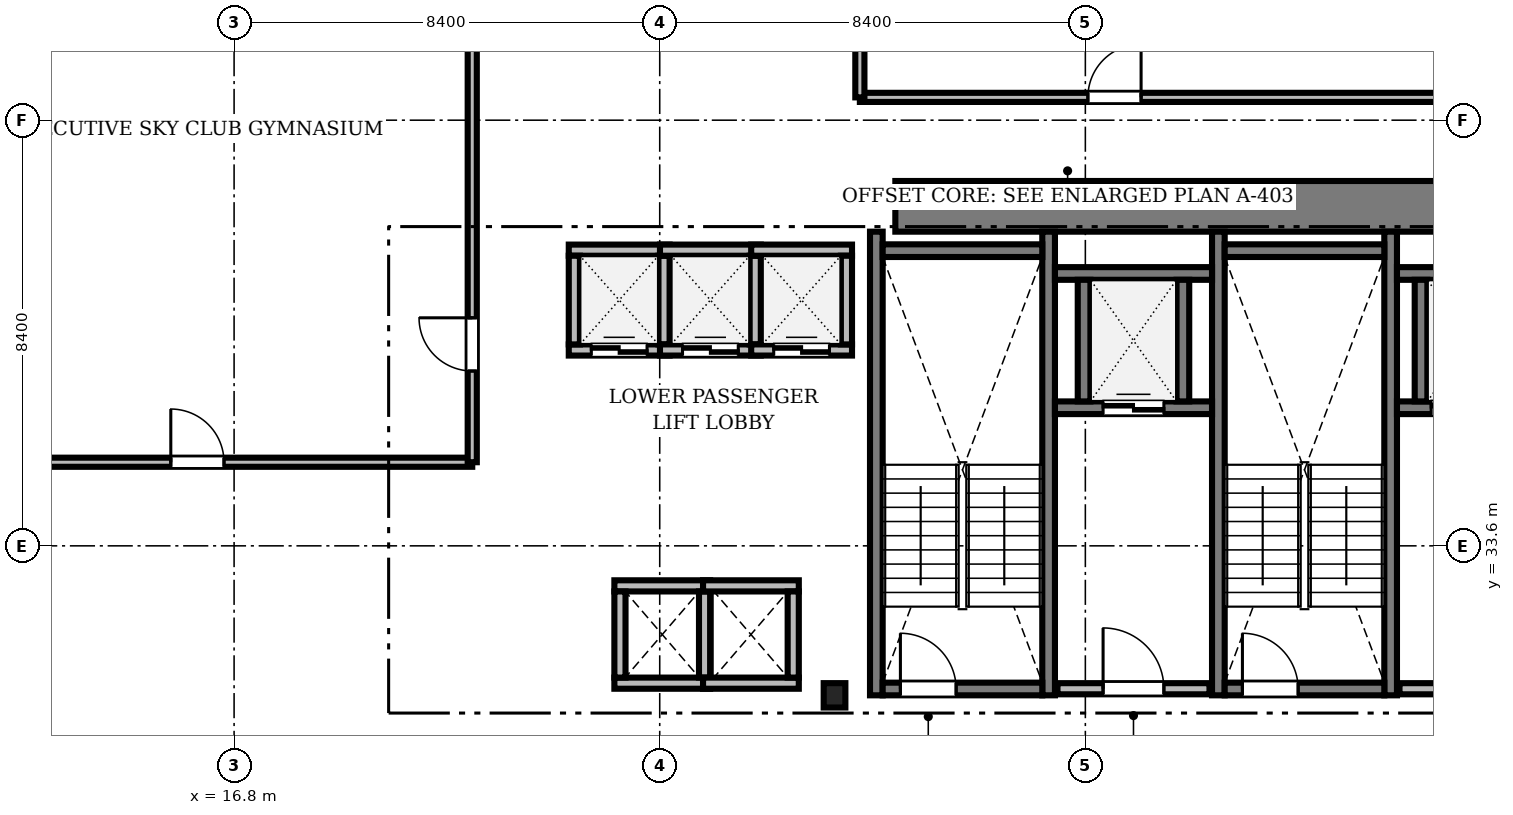
"""IFC4 building model, lengths in metres.
Left out: names, types, materials, properties, quantities, classifications, styles, units other than length and angle.
Written with IfcOpenShell. Run it as: python <this file> out.ifc"""

import sys

from ifc_helpers import new_model, si_unit, direction, frame, frame_2d, origin, origin_2d, place, context, subcontext, project, spatial, rectangle, i_section, extrude, source, transform, mapped, element, fill, save


model = new_model("IFC4")
c1 = context("Model", 3, precision=1e-05, world=origin(), true_north=direction((0.0, 1.0)))
c2 = subcontext(c1, "Body", "Model", "MODEL_VIEW")
j1 = project(units=[si_unit("LENGTHUNIT", "METRE"), si_unit("PLANEANGLEUNIT", "RADIAN")], contexts=[c1])
p1 = place(None, origin())
s1 = spatial("IfcSite", under=j1, at=p1, CompositionType="ELEMENT")
p2 = place(p1, origin())
s2 = spatial("IfcBuilding", under=s1, at=p2, CompositionType="ELEMENT")
p3 = place(p2, frame((0.0, 0.0, 38.55)))
s3 = spatial("IfcBuildingStorey", under=s2, at=p3, CompositionType="ELEMENT", Elevation=38.55)
m1 = source(origin(), c2, "Body", "SweptSolid", [
    extrude(rectangle(XDim=17.52, YDim=1.0, at=frame_2d((8.76, 0.0))), origin(), (0.0, 0.0, 1.0), 3.41),
])
p4 = place(p3, frame((29.85, 40.3, 0.0), z_axis=(0.0, 0.0, 1.0), x_axis=(1.0, 0.0, 0.0)))
e1 = element("IfcWall", 1, at=p4, inside=s3, PredefinedType="SHEAR", context=c2, shape_type="MappedRepresentation", body=[
    mapped(m1, transform((0.0, 0.0, 0.0), scale=1.0)),
])
m2 = source(origin(), c2, "Body", "SweptSolid", [
    extrude(i_section(OverallWidth=0.428, OverallDepth=0.481, WebThickness=0.04, FlangeThickness=0.063, FilletRadius=0.015, at=origin_2d()), origin(), (0.0, 0.0, 1.0), 3.41),
])
p5 = place(p3, frame((28.65, 30.65, 0.0), z_axis=(0.0, 0.0, 1.0), x_axis=(1.0, 0.0, 0.0)))
e2 = element("IfcColumn", 2, at=p5, inside=s3, PredefinedType="COLUMN", context=c2, shape_type="MappedRepresentation", body=[
    mapped(m2, transform((0.0, 0.0, 0.0), scale=1.0)),
])
m3 = source(origin(), c2, "Body", "SweptSolid", [
    extrude(rectangle(XDim=9.15, YDim=0.25, at=frame_2d((4.575, 0.0))), origin(), (0.0, 0.0, 1.0), 3.45),
])
for number, where, z_axis, x_axis in (
    (3, (29.475, 30.65, 0.0), (0.0, 0.0, 1.0), (0.0, 1.0, 0.0)),
    (4, (32.875, 30.65, 0.0), (0.0, 0.0, 1.0), (0.0, 1.0, 0.0)),
):
    element("IfcWall", number, at=place(p3, frame(where, z_axis=z_axis, x_axis=x_axis)), inside=s3, PredefinedType="SOLIDWALL", context=c2, shape_type="MappedRepresentation", body=[
        mapped(m3, transform((0.0, 0.0, 0.0), scale=1.0)),
    ])
m4 = source(origin(), c2, "Body", "SweptSolid", [
    extrude(rectangle(XDim=3.15, YDim=0.25, at=frame_2d((1.575, 0.0))), origin(), (0.0, 0.0, 1.0), 3.45),
])
p6 = place(p3, frame((29.6, 39.425, 0.0), z_axis=(0.0, 0.0, 1.0), x_axis=(1.0, 0.0, 0.0)))
e5 = element("IfcWall", 5, at=p6, inside=s3, PredefinedType="SOLIDWALL", context=c2, shape_type="MappedRepresentation", body=[
    mapped(m4, transform((0.0, 0.0, 0.0), scale=1.0)),
])
p7 = place(p3, frame((29.6, 30.775, 0.0), z_axis=(0.0, 0.0, 1.0), x_axis=(1.0, 0.0, 0.0)))
e6 = element("IfcWall", 6, at=p7, inside=s3, PredefinedType="SOLIDWALL", context=c2, shape_type="MappedRepresentation", body=[
    mapped(m4, transform((0.0, 0.0, 0.0), scale=1.0)),
])
m5 = source(origin(), c2, "Body", "SweptSolid", [
    extrude(rectangle(XDim=1.1, YDim=2.2, at=frame_2d((0.55, 1.1))), frame((0.0, 0.135, 0.0), z_axis=(0.0, -1.0, 0.0), x_axis=(1.0, 0.0, 0.0)), (0.0, 0.0, 1.0), 0.27),
])
p8 = place(p7, frame((0.35, 0.0, 0.0)))
e7 = element("IfcOpeningElement", 7, at=p8, cuts=e6, PredefinedType="OPENING", context=c2, shape_type="MappedRepresentation", body=[
    mapped(m5, transform((0.0, 0.0, 0.0), scale=1.0)),
])
for number, where, z_axis, x_axis in (
    (8, (36.225, 30.65, 0.0), (0.0, 0.0, 1.0), (0.0, 1.0, 0.0)),
    (9, (39.625, 30.65, 0.0), (0.0, 0.0, 1.0), (0.0, 1.0, 0.0)),
):
    element("IfcWall", number, at=place(p3, frame(where, z_axis=z_axis, x_axis=x_axis)), inside=s3, PredefinedType="SOLIDWALL", context=c2, shape_type="MappedRepresentation", body=[
        mapped(m3, transform((0.0, 0.0, 0.0), scale=1.0)),
    ])
p9 = place(p3, frame((36.35, 39.425, 0.0), z_axis=(0.0, 0.0, 1.0), x_axis=(1.0, 0.0, 0.0)))
e10 = element("IfcWall", 10, at=p9, inside=s3, PredefinedType="SOLIDWALL", context=c2, shape_type="MappedRepresentation", body=[
    mapped(m4, transform((0.0, 0.0, 0.0), scale=1.0)),
])
p10 = place(p3, frame((36.35, 30.775, 0.0), z_axis=(0.0, 0.0, 1.0), x_axis=(1.0, 0.0, 0.0)))
e11 = element("IfcWall", 11, at=p10, inside=s3, PredefinedType="SOLIDWALL", context=c2, shape_type="MappedRepresentation", body=[
    mapped(m4, transform((0.0, 0.0, 0.0), scale=1.0)),
])
p11 = place(p10, frame((0.35, 0.0, 0.0)))
e12 = element("IfcOpeningElement", 12, at=p11, cuts=e11, PredefinedType="OPENING", context=c2, shape_type="MappedRepresentation", body=[
    mapped(m5, transform((0.0, 0.0, 0.0), scale=1.0)),
])
m6 = source(origin(), c2, "Body", "SweptSolid", [
    extrude(rectangle(XDim=3.0, YDim=0.22, at=frame_2d((1.5, 0.0))), origin(), (0.0, 0.0, 1.0), 3.41),
])
p12 = place(p3, frame((33.05, 30.78, 0.0), z_axis=(0.0, 0.0, 1.0), x_axis=(1.0, 0.0, 0.0)))
e13 = element("IfcWall", 13, at=p12, inside=s3, PredefinedType="SOLIDWALL", context=c2, shape_type="MappedRepresentation", body=[
    mapped(m6, transform((0.0, 0.0, 0.0), scale=1.0)),
])
m7 = source(origin(), c2, "Body", "SweptSolid", [
    extrude(rectangle(XDim=1.2, YDim=2.2, at=frame_2d((0.6, 1.1))), frame((0.0, 0.12, 0.0), z_axis=(0.0, -1.0, 0.0), x_axis=(1.0, 0.0, 0.0)), (0.0, 0.0, 1.0), 0.24),
])
p13 = place(p12, frame((0.9, 0.0, 0.0)))
e14 = element("IfcOpeningElement", 14, at=p13, cuts=e13, PredefinedType="OPENING", context=c2, shape_type="MappedRepresentation", body=[
    mapped(m7, transform((0.0, 0.0, 0.0), scale=1.0)),
])
m8 = source(origin(), c2, "Body", "SweptSolid", [
    extrude(rectangle(XDim=2.8, YDim=0.22, at=frame_2d((1.4, 0.0))), origin(), (0.0, 0.0, 1.0), 3.41),
])
p14 = place(p3, frame((39.8, 30.78, 0.0), z_axis=(0.0, 0.0, 1.0), x_axis=(1.0, 0.0, 0.0)))
e15 = element("IfcWall", 15, at=p14, inside=s3, PredefinedType="SOLIDWALL", context=c2, shape_type="MappedRepresentation", body=[
    mapped(m8, transform((0.0, 0.0, 0.0), scale=1.0)),
])
p15 = place(p14, frame((0.8, 0.0, 0.0)))
e16 = element("IfcOpeningElement", 16, at=p15, cuts=e15, PredefinedType="OPENING", context=c2, shape_type="MappedRepresentation", body=[
    mapped(m7, transform((0.0, 0.0, 0.0), scale=1.0)),
])
m9 = source(origin(), c2, "Body", "SweptSolid", [
    extrude(rectangle(XDim=1.99, YDim=0.22, at=frame_2d((0.995, 0.0))), origin(), (0.0, 0.0, 1.0), 3.41),
])
p16 = place(p3, frame((23.405, 37.465, 0.0), z_axis=(0.0, 0.0, 1.0), x_axis=(1.0, 0.0, 0.0)))
e17 = element("IfcWall", 17, at=p16, inside=s3, PredefinedType="SOLIDWALL", context=c2, shape_type="MappedRepresentation", body=[
    mapped(m9, transform((0.0, 0.0, 0.0), scale=1.0)),
])
m10 = source(origin(), c2, "Body", "SweptSolid", [
    extrude(rectangle(XDim=1.1, YDim=2.2, at=frame_2d((0.55, 1.1))), frame((0.0, 0.12, 0.0), z_axis=(0.0, -1.0, 0.0), x_axis=(1.0, 0.0, 0.0)), (0.0, 0.0, 1.0), 0.24),
])
p17 = place(p16, frame((0.445, 0.0, 0.0)))
e18 = element("IfcOpeningElement", 18, at=p17, cuts=e17, PredefinedType="OPENING", context=c2, shape_type="MappedRepresentation", body=[
    mapped(m10, transform((0.0, 0.0, 0.0), scale=1.0)),
])
p18 = place(p3, frame((23.405, 39.435, 0.0), z_axis=(0.0, 0.0, 1.0), x_axis=(1.0, 0.0, 0.0)))
e19 = element("IfcWall", 19, at=p18, inside=s3, PredefinedType="SOLIDWALL", context=c2, shape_type="MappedRepresentation", body=[
    mapped(m9, transform((0.0, 0.0, 0.0), scale=1.0)),
])
m11 = source(origin(), c2, "Body", "SweptSolid", [
    extrude(rectangle(XDim=1.75, YDim=0.22, at=frame_2d((0.875, 0.0))), origin(), (0.0, 0.0, 1.0), 3.41),
])
for number, where, z_axis, x_axis in (
    (20, (23.515, 37.575, 0.0), (0.0, 0.0, 1.0), (0.0, 1.0, 0.0)),
    (21, (25.285, 37.575, 0.0), (0.0, 0.0, 1.0), (0.0, 1.0, 0.0)),
):
    element("IfcWall", number, at=place(p3, frame(where, z_axis=z_axis, x_axis=x_axis)), inside=s3, PredefinedType="SOLIDWALL", context=c2, shape_type="MappedRepresentation", body=[
        mapped(m11, transform((0.0, 0.0, 0.0), scale=1.0)),
    ])
p19 = place(p3, frame((25.205, 37.465, 0.0), z_axis=(0.0, 0.0, 1.0), x_axis=(1.0, 0.0, 0.0)))
e22 = element("IfcWall", 22, at=p19, inside=s3, PredefinedType="SOLIDWALL", context=c2, shape_type="MappedRepresentation", body=[
    mapped(m9, transform((0.0, 0.0, 0.0), scale=1.0)),
])
p20 = place(p19, frame((0.445, 0.0, 0.0)))
e23 = element("IfcOpeningElement", 23, at=p20, cuts=e22, PredefinedType="OPENING", context=c2, shape_type="MappedRepresentation", body=[
    mapped(m10, transform((0.0, 0.0, 0.0), scale=1.0)),
])
p21 = place(p3, frame((25.205, 39.435, 0.0), z_axis=(0.0, 0.0, 1.0), x_axis=(1.0, 0.0, 0.0)))
e24 = element("IfcWall", 24, at=p21, inside=s3, PredefinedType="SOLIDWALL", context=c2, shape_type="MappedRepresentation", body=[
    mapped(m9, transform((0.0, 0.0, 0.0), scale=1.0)),
])
p22 = place(p3, frame((27.085, 37.575, 0.0), z_axis=(0.0, 0.0, 1.0), x_axis=(0.0, 1.0, 0.0)))
e25 = element("IfcWall", 25, at=p22, inside=s3, PredefinedType="SOLIDWALL", context=c2, shape_type="MappedRepresentation", body=[
    mapped(m11, transform((0.0, 0.0, 0.0), scale=1.0)),
])
m12 = source(origin(), c2, "Body", "SweptSolid", [
    extrude(rectangle(XDim=1.99, YDim=0.22, at=frame_2d((0.995, 0.0))), origin(), (0.0, 0.0, 1.0), 3.41),
])
p23 = place(p3, frame((27.005, 37.465, 0.0), z_axis=(0.0, 0.0, 1.0), x_axis=(1.0, 0.0, 0.0)))
e26 = element("IfcWall", 26, at=p23, inside=s3, PredefinedType="SOLIDWALL", context=c2, shape_type="MappedRepresentation", body=[
    mapped(m12, transform((0.0, 0.0, 0.0), scale=1.0)),
])
p24 = place(p23, frame((0.445, 0.0, 0.0)))
e27 = element("IfcOpeningElement", 27, at=p24, cuts=e26, PredefinedType="OPENING", context=c2, shape_type="MappedRepresentation", body=[
    mapped(m10, transform((0.0, 0.0, 0.0), scale=1.0)),
])
p25 = place(p3, frame((27.005, 39.435, 0.0), z_axis=(0.0, 0.0, 1.0), x_axis=(1.0, 0.0, 0.0)))
e28 = element("IfcWall", 28, at=p25, inside=s3, PredefinedType="SOLIDWALL", context=c2, shape_type="MappedRepresentation", body=[
    mapped(m12, transform((0.0, 0.0, 0.0), scale=1.0)),
])
p26 = place(p3, frame((28.885, 37.575, 0.0), z_axis=(0.0, 0.0, 1.0), x_axis=(0.0, 1.0, 0.0)))
e29 = element("IfcWall", 29, at=p26, inside=s3, PredefinedType="SOLIDWALL", context=c2, shape_type="MappedRepresentation", body=[
    mapped(m11, transform((0.0, 0.0, 0.0), scale=1.0)),
])
m13 = source(origin(), c2, "Body", "SweptSolid", [
    extrude(rectangle(XDim=3.1, YDim=0.25, at=frame_2d((1.55, 0.0))), origin(), (0.0, 0.0, 1.0), 3.41),
])
p27 = place(p3, frame((33.0, 36.325, 0.0), z_axis=(0.0, 0.0, 1.0), x_axis=(1.0, 0.0, 0.0)))
e30 = element("IfcWall", 30, at=p27, inside=s3, PredefinedType="SOLIDWALL", context=c2, shape_type="MappedRepresentation", body=[
    mapped(m13, transform((0.0, 0.0, 0.0), scale=1.0)),
])
m14 = source(origin(), c2, "Body", "SweptSolid", [
    extrude(rectangle(XDim=1.2, YDim=2.25, at=frame_2d((0.6, 1.125))), frame((0.0, 0.135, 0.0), z_axis=(0.0, -1.0, 0.0), x_axis=(1.0, 0.0, 0.0)), (0.0, 0.0, 1.0), 0.27),
])
p28 = place(p27, frame((0.95, 0.0, 0.0)))
e31 = element("IfcOpeningElement", 31, at=p28, cuts=e30, PredefinedType="OPENING", context=c2, shape_type="MappedRepresentation", body=[
    mapped(m14, transform((0.0, 0.0, 0.0), scale=1.0)),
])
p29 = place(p3, frame((33.0, 38.975, 0.0), z_axis=(0.0, 0.0, 1.0), x_axis=(1.0, 0.0, 0.0)))
e32 = element("IfcWall", 32, at=p29, inside=s3, PredefinedType="SOLIDWALL", context=c2, shape_type="MappedRepresentation", body=[
    mapped(m13, transform((0.0, 0.0, 0.0), scale=1.0)),
])
m15 = source(origin(), c2, "Body", "SweptSolid", [
    extrude(rectangle(XDim=2.4, YDim=0.25, at=frame_2d((1.2, 0.0))), origin(), (0.0, 0.0, 1.0), 3.41),
])
for number, where, z_axis, x_axis in (
    (33, (33.575, 36.45, 0.0), (0.0, 0.0, 1.0), (0.0, 1.0, 0.0)),
    (34, (35.525, 36.45, 0.0), (0.0, 0.0, 1.0), (0.0, 1.0, 0.0)),
):
    element("IfcWall", number, at=place(p3, frame(where, z_axis=z_axis, x_axis=x_axis)), inside=s3, PredefinedType="SOLIDWALL", context=c2, shape_type="MappedRepresentation", body=[
        mapped(m15, transform((0.0, 0.0, 0.0), scale=1.0)),
    ])
m16 = source(origin(), c2, "Body", "SweptSolid", [
    extrude(rectangle(XDim=2.55, YDim=0.25, at=frame_2d((1.275, 0.0))), origin(), (0.0, 0.0, 1.0), 3.41),
])
p30 = place(p3, frame((39.75, 36.325, 0.0), z_axis=(0.0, 0.0, 1.0), x_axis=(1.0, 0.0, 0.0)))
e35 = element("IfcWall", 35, at=p30, inside=s3, PredefinedType="SOLIDWALL", context=c2, shape_type="MappedRepresentation", body=[
    mapped(m16, transform((0.0, 0.0, 0.0), scale=1.0)),
])
p31 = place(p30, frame((0.675, 0.0, 0.0)))
e36 = element("IfcOpeningElement", 36, at=p31, cuts=e35, PredefinedType="OPENING", context=c2, shape_type="MappedRepresentation", body=[
    mapped(m14, transform((0.0, 0.0, 0.0), scale=1.0)),
])
p32 = place(p3, frame((39.75, 38.975, 0.0), z_axis=(0.0, 0.0, 1.0), x_axis=(1.0, 0.0, 0.0)))
e37 = element("IfcWall", 37, at=p32, inside=s3, PredefinedType="SOLIDWALL", context=c2, shape_type="MappedRepresentation", body=[
    mapped(m16, transform((0.0, 0.0, 0.0), scale=1.0)),
])
p33 = place(p3, frame((40.225, 36.45, 0.0), z_axis=(0.0, 0.0, 1.0), x_axis=(0.0, 1.0, 0.0)))
e38 = element("IfcWall", 38, at=p33, inside=s3, PredefinedType="SOLIDWALL", context=c2, shape_type="MappedRepresentation", body=[
    mapped(m15, transform((0.0, 0.0, 0.0), scale=1.0)),
])
m17 = source(origin(), c2, "Body", "SweptSolid", [
    extrude(rectangle(XDim=1.89, YDim=0.22, at=frame_2d((0.945, 0.0))), origin(), (0.0, 0.0, 1.0), 3.41),
])
for number, where, z_axis, x_axis in (
    (39, (24.305, 30.89, 0.0), (0.0, 0.0, 1.0), (1.0, 0.0, 0.0)),
    (40, (24.305, 32.81, 0.0), (0.0, 0.0, 1.0), (1.0, 0.0, 0.0)),
):
    element("IfcWall", number, at=place(p3, frame(where, z_axis=z_axis, x_axis=x_axis)), inside=s3, PredefinedType="SOLIDWALL", context=c2, shape_type="MappedRepresentation", body=[
        mapped(m17, transform((0.0, 0.0, 0.0), scale=1.0)),
    ])
m18 = source(origin(), c2, "Body", "SweptSolid", [
    extrude(rectangle(XDim=1.7, YDim=0.22, at=frame_2d((0.85, 0.0))), origin(), (0.0, 0.0, 1.0), 3.41),
])
for number, where, z_axis, x_axis in (
    (41, (24.415, 31.0, 0.0), (0.0, 0.0, 1.0), (0.0, 1.0, 0.0)),
    (42, (26.085, 31.0, 0.0), (0.0, 0.0, 1.0), (0.0, 1.0, 0.0)),
):
    element("IfcWall", number, at=place(p3, frame(where, z_axis=z_axis, x_axis=x_axis)), inside=s3, PredefinedType="SOLIDWALL", context=c2, shape_type="MappedRepresentation", body=[
        mapped(m18, transform((0.0, 0.0, 0.0), scale=1.0)),
    ])
for number, where, z_axis, x_axis in (
    (43, (26.055, 30.89, 0.0), (0.0, 0.0, 1.0), (1.0, 0.0, 0.0)),
    (44, (26.055, 32.81, 0.0), (0.0, 0.0, 1.0), (1.0, 0.0, 0.0)),
):
    element("IfcWall", number, at=place(p3, frame(where, z_axis=z_axis, x_axis=x_axis)), inside=s3, PredefinedType="SOLIDWALL", context=c2, shape_type="MappedRepresentation", body=[
        mapped(m17, transform((0.0, 0.0, 0.0), scale=1.0)),
    ])
p34 = place(p3, frame((27.835, 31.0, 0.0), z_axis=(0.0, 0.0, 1.0), x_axis=(0.0, 1.0, 0.0)))
e45 = element("IfcWall", 45, at=p34, inside=s3, PredefinedType="SOLIDWALL", context=c2, shape_type="MappedRepresentation", body=[
    mapped(m18, transform((0.0, 0.0, 0.0), scale=1.0)),
])
m19 = source(origin(), c2, "Body", "SweptSolid", [
    extrude(rectangle(XDim=19.428, YDim=0.18, at=frame_2d((9.714, 0.0))), origin(), (0.0, 0.0, 1.0), 2.652),
])
p35 = place(p3, frame((29.15, 42.45, 0.0), z_axis=(0.0, 0.0, 1.0), x_axis=(1.0, 0.0, 0.0)))
e46 = element("IfcWall", 46, at=p35, inside=s3, PredefinedType="PARTITIONING", context=c2, shape_type="MappedRepresentation", body=[
    mapped(m19, transform((0.0, 0.0, 0.0), scale=1.0)),
])
m20 = source(origin(), c2, "Body", "SweptSolid", [
    extrude(rectangle(XDim=1.05, YDim=2.2, at=frame_2d((0.525, 1.1))), frame((0.0, 0.1, 0.0), z_axis=(0.0, -1.0, 0.0), x_axis=(1.0, 0.0, 0.0)), (0.0, 0.0, 1.0), 0.2),
])
p36 = place(p35, frame((4.5, 0.0, 0.0)))
e47 = element("IfcOpeningElement", 47, at=p36, cuts=e46, PredefinedType="OPENING", context=c2, shape_type="MappedRepresentation", body=[
    mapped(m20, transform((0.0, 0.0, 0.0), scale=1.0)),
])
m21 = source(origin(), c2, "Body", "SweptSolid", [
    extrude(rectangle(XDim=19.078, YDim=0.18, at=frame_2d((9.539, 0.0))), origin(), (0.0, 0.0, 1.0), 2.652),
])
p37 = place(p3, frame((2.422, 35.25, 0.0), z_axis=(0.0, 0.0, 1.0), x_axis=(1.0, 0.0, 0.0)))
e48 = element("IfcWall", 48, at=p37, inside=s3, PredefinedType="PARTITIONING", context=c2, shape_type="MappedRepresentation", body=[
    mapped(m21, transform((0.0, 0.0, 0.0), scale=1.0)),
])
p38 = place(p37, frame((13.129, 0.0, 0.0)))
e49 = element("IfcOpeningElement", 49, at=p38, cuts=e48, PredefinedType="OPENING", context=c2, shape_type="MappedRepresentation", body=[
    mapped(m20, transform((0.0, 0.0, 0.0), scale=1.0)),
])
m22 = source(origin(), c2, "Body", "SweptSolid", [
    extrude(rectangle(XDim=13.028, YDim=0.18, at=frame_2d((6.514, 0.0))), origin(), (0.0, 0.0, 1.0), 2.652),
])
p39 = place(p3, frame((21.5, 35.25, 0.0), z_axis=(0.0, 0.0, 1.0), x_axis=(0.0, 1.0, 0.0)))
e50 = element("IfcWall", 50, at=p39, inside=s3, PredefinedType="PARTITIONING", context=c2, shape_type="MappedRepresentation", body=[
    mapped(m22, transform((0.0, 0.0, 0.0), scale=1.0)),
])
p40 = place(p39, frame((1.8, 0.0, 0.0)))
e51 = element("IfcOpeningElement", 51, at=p40, cuts=e50, PredefinedType="OPENING", context=c2, shape_type="MappedRepresentation", body=[
    mapped(m20, transform((0.0, 0.0, 0.0), scale=1.0)),
])
m23 = source(origin(), c2, "Body", "SweptSolid", [
    extrude(rectangle(XDim=5.828, YDim=0.18, at=frame_2d((2.914, 0.0))), origin(), (0.0, 0.0, 1.0), 2.652),
])
p41 = place(p3, frame((29.15, 42.45, 0.0), z_axis=(0.0, 0.0, 1.0), x_axis=(0.0, 1.0, 0.0)))
e52 = element("IfcWall", 52, at=p41, inside=s3, PredefinedType="PARTITIONING", context=c2, shape_type="MappedRepresentation", body=[
    mapped(m23, transform((0.0, 0.0, 0.0), scale=1.0)),
])
m24 = source(origin(), c2, "Body", "SweptSolid", [
    extrude(rectangle(XDim=1.1, YDim=2.2, at=frame_2d((0.55, 1.1))), frame((0.0, 0.025, 0.0), z_axis=(0.0, -1.0, 0.0), x_axis=(1.0, 0.0, 0.0)), (0.0, 0.0, 1.0), 0.05),
])
p42 = place(p8, origin())
e53 = element("IfcDoor", 53, at=p42, inside=s3, OperationType="SINGLE_SWING_LEFT", PredefinedType="DOOR", context=c2, shape_type="MappedRepresentation", body=[
    mapped(m24, transform((0.0, 0.0, 0.0), scale=1.0)),
])
fill(e7, e53)
p43 = place(p11, origin())
e54 = element("IfcDoor", 54, at=p43, inside=s3, OperationType="SINGLE_SWING_LEFT", PredefinedType="DOOR", context=c2, shape_type="MappedRepresentation", body=[
    mapped(m24, transform((0.0, 0.0, 0.0), scale=1.0)),
])
fill(e12, e54)
m25 = source(origin(), c2, "Body", "SweptSolid", [
    extrude(rectangle(XDim=1.2, YDim=2.2, at=frame_2d((0.6, 1.1))), frame((0.0, 0.025, 0.0), z_axis=(0.0, -1.0, 0.0), x_axis=(1.0, 0.0, 0.0)), (0.0, 0.0, 1.0), 0.05),
])
p44 = place(p13, origin())
e55 = element("IfcDoor", 55, at=p44, inside=s3, OperationType="SINGLE_SWING_LEFT", PredefinedType="DOOR", context=c2, shape_type="MappedRepresentation", body=[
    mapped(m25, transform((0.0, 0.0, 0.0), scale=1.0)),
])
fill(e14, e55)
p45 = place(p17, origin())
e56 = element("IfcDoor", 56, at=p45, inside=s3, OperationType="DOUBLE_DOOR_SLIDING", PredefinedType="DOOR", context=c2, shape_type="MappedRepresentation", body=[
    mapped(m24, transform((0.0, 0.0, 0.0), scale=1.0)),
])
fill(e18, e56)
p46 = place(p20, origin())
e57 = element("IfcDoor", 57, at=p46, inside=s3, OperationType="DOUBLE_DOOR_SLIDING", PredefinedType="DOOR", context=c2, shape_type="MappedRepresentation", body=[
    mapped(m24, transform((0.0, 0.0, 0.0), scale=1.0)),
])
fill(e23, e57)
p47 = place(p24, origin())
e58 = element("IfcDoor", 58, at=p47, inside=s3, OperationType="DOUBLE_DOOR_SLIDING", PredefinedType="DOOR", context=c2, shape_type="MappedRepresentation", body=[
    mapped(m24, transform((0.0, 0.0, 0.0), scale=1.0)),
])
fill(e27, e58)
m26 = source(origin(), c2, "Body", "SweptSolid", [
    extrude(rectangle(XDim=1.2, YDim=2.25, at=frame_2d((0.6, 1.125))), frame((0.0, 0.025, 0.0), z_axis=(0.0, -1.0, 0.0), x_axis=(1.0, 0.0, 0.0)), (0.0, 0.0, 1.0), 0.05),
])
p48 = place(p28, origin())
e59 = element("IfcDoor", 59, at=p48, inside=s3, OperationType="DOUBLE_DOOR_SLIDING", PredefinedType="DOOR", context=c2, shape_type="MappedRepresentation", body=[
    mapped(m26, transform((0.0, 0.0, 0.0), scale=1.0)),
])
fill(e31, e59)
p49 = place(p31, origin())
e60 = element("IfcDoor", 60, at=p49, inside=s3, OperationType="DOUBLE_DOOR_SLIDING", PredefinedType="DOOR", context=c2, shape_type="MappedRepresentation", body=[
    mapped(m26, transform((0.0, 0.0, 0.0), scale=1.0)),
])
fill(e36, e60)
m27 = source(origin(), c2, "Body", "SweptSolid", [
    extrude(rectangle(XDim=1.05, YDim=2.2, at=frame_2d((0.525, 1.1))), frame((0.0, 0.025, 0.0), z_axis=(0.0, -1.0, 0.0), x_axis=(1.0, 0.0, 0.0)), (0.0, 0.0, 1.0), 0.05),
])
p50 = place(p36, origin())
e61 = element("IfcDoor", 61, at=p50, inside=s3, OperationType="SINGLE_SWING_RIGHT", PredefinedType="DOOR", context=c2, shape_type="MappedRepresentation", body=[
    mapped(m27, transform((0.0, 0.0, 0.0), scale=1.0)),
])
fill(e47, e61)
p51 = place(p38, origin())
e62 = element("IfcDoor", 62, at=p51, inside=s3, OperationType="SINGLE_SWING_LEFT", PredefinedType="DOOR", context=c2, shape_type="MappedRepresentation", body=[
    mapped(m27, transform((0.0, 0.0, 0.0), scale=1.0)),
])
fill(e49, e62)
p52 = place(p40, origin())
e63 = element("IfcDoor", 63, at=p52, inside=s3, OperationType="SINGLE_SWING_RIGHT", PredefinedType="DOOR", context=c2, shape_type="MappedRepresentation", body=[
    mapped(m27, transform((0.0, 0.0, 0.0), scale=1.0)),
])
fill(e51, e63)
save(model, sys.argv[1])
